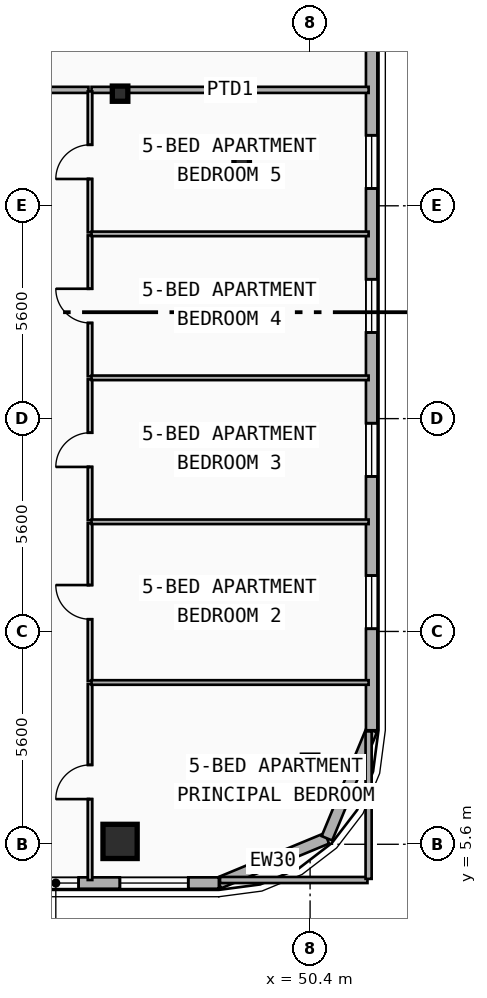
"""IFC4 building model, lengths in metres.
Left out: names, types, materials, properties, quantities, classifications, styles, units other than length and angle.
Written with IfcOpenShell. Run it as: python <this file> out.ifc"""

import sys

from ifc_helpers import new_model, si_unit, direction, frame, frame_2d, origin, origin_2d, place, context, subcontext, project, spatial, rectangle, i_section, extrude, element, fill, save


model = new_model("IFC4")
c1 = context("Model", 3, precision=1e-05, world=origin(), true_north=direction((0.0, 1.0)))
c2 = subcontext(c1, "Body", "Model", "MODEL_VIEW")
j1 = project(units=[si_unit("LENGTHUNIT", "METRE"), si_unit("PLANEANGLEUNIT", "RADIAN")], contexts=[c1])
p1 = place(None, origin())
s1 = spatial("IfcSite", under=j1, at=p1, CompositionType="ELEMENT")
p2 = place(p1, origin())
s2 = spatial("IfcBuilding", under=s1, at=p2, CompositionType="ELEMENT")
p3 = place(p2, frame((0.0, 0.0, 225.6)))
s3 = spatial("IfcBuildingStorey", under=s2, at=p3, CompositionType="ELEMENT", Elevation=225.6)
p4 = place(p3, frame((45.4, 25.35, 0.0), z_axis=(0.0, 0.0, 1.0), x_axis=(1.0, 0.0, 0.0)))
e1 = element("IfcColumn", 1, at=p4, inside=s3, PredefinedType="COLUMN", context=c2, shape_type="SweptSolid", body=[
    extrude(i_section(OverallWidth=0.408, OverallDepth=0.4, WebThickness=0.025, FlangeThickness=0.039, FilletRadius=0.015, at=origin_2d()), origin(), (0.0, 0.0, 1.0), 3.6),
])
p5 = place(p3, frame((45.4, 5.784, 0.0), z_axis=(0.0, -0.090237335163, 0.995920289653), x_axis=(1.0, 0.0, 0.0)))
e2 = element("IfcColumn", 2, at=p5, inside=s3, PredefinedType="COLUMN", context=c2, shape_type="SweptSolid", body=[
    extrude(rectangle(XDim=0.9, YDim=0.9, at=origin_2d()), origin(), (0.0, 0.0, 1.0), 3.615),
])
p6 = place(p3, frame((48.6, 23.6, 0.0), z_axis=(0.0, 0.0, 1.0), x_axis=(1.0, 0.0, 0.0)))
e3 = element("IfcColumn", 3, at=p6, inside=s3, PredefinedType="COLUMN", context=c2, shape_type="SweptSolid", body=[
    extrude(i_section(OverallWidth=0.408, OverallDepth=0.4, WebThickness=0.025, FlangeThickness=0.039, FilletRadius=0.015, at=origin_2d()), origin(), (0.0, 0.0, 1.0), 3.6),
])
p7 = place(p3, frame((50.4, 7.843, 0.0), z_axis=(0.0, -0.079906436036, 0.996802368316), x_axis=(1.0, 0.0, 0.0)))
e4 = element("IfcColumn", 4, at=p7, inside=s3, PredefinedType="COLUMN", context=c2, shape_type="SweptSolid", body=[
    extrude(i_section(OverallWidth=0.408, OverallDepth=0.4, WebThickness=0.025, FlangeThickness=0.039, FilletRadius=0.015, at=origin_2d()), origin(), (0.0, 0.0, 1.0), 3.611),
])
p8 = place(p3, frame((50.843, 5.757, 0.0), z_axis=(0.0, 0.0, 1.0), x_axis=(-0.92389884758, -0.382636798336, 0.0)))
e5 = element("IfcWall", 5, at=p8, inside=s3, PredefinedType="SOLIDWALL", context=c2, shape_type="SweptSolid", body=[
    extrude(rectangle(XDim=3.077, YDim=0.3, at=frame_2d((1.538, 0.0))), origin(), (0.0, 0.0, 1.0), 3.34),
])
p9 = place(p3, frame((52.02, 8.6, 0.0), z_axis=(0.0, 0.0, 1.0), x_axis=(-0.382676475685, -0.923882414032, 0.0)))
e6 = element("IfcWall", 6, at=p9, inside=s3, PredefinedType="SOLIDWALL", context=c2, shape_type="SweptSolid", body=[
    extrude(rectangle(XDim=3.077, YDim=0.3, at=frame_2d((1.539, 0.0))), origin(), (0.0, 0.0, 1.0), 3.34),
])
p10 = place(p3, frame((52.02, 37.2, 0.0), z_axis=(0.0, 0.0, 1.0), x_axis=(0.0, -1.0, 0.0)))
e7 = element("IfcWall", 7, at=p10, inside=s3, PredefinedType="SOLIDWALL", context=c2, shape_type="SweptSolid", body=[
    extrude(rectangle(XDim=28.6, YDim=0.3, at=frame_2d((14.3, 0.0))), origin(), (0.0, 0.0, 1.0), 3.34),
])
p11 = place(p10, frame((2.38, 0.0, 0.34)))
e8 = element("IfcOpeningElement", 8, at=p11, cuts=e7, PredefinedType="OPENING", context=c2, shape_type="SweptSolid", body=[
    extrude(rectangle(XDim=1.4, YDim=2.1, at=frame_2d((0.7, 1.05))), frame((0.0, 0.16, 0.0), z_axis=(0.0, -1.0, 0.0), x_axis=(1.0, 0.0, 0.0)), (0.0, 0.0, 1.0), 0.32),
])
p12 = place(p10, frame((5.84, 0.0, 0.34)))
e9 = element("IfcOpeningElement", 9, at=p12, cuts=e7, PredefinedType="OPENING", context=c2, shape_type="SweptSolid", body=[
    extrude(rectangle(XDim=1.4, YDim=2.1, at=frame_2d((0.7, 1.05))), frame((0.0, 0.16, 0.0), z_axis=(0.0, -1.0, 0.0), x_axis=(1.0, 0.0, 0.0)), (0.0, 0.0, 1.0), 0.32),
])
p13 = place(p10, frame((24.529, 0.0, 0.34)))
e10 = element("IfcOpeningElement", 10, at=p13, cuts=e7, PredefinedType="OPENING", context=c2, shape_type="SweptSolid", body=[
    extrude(rectangle(XDim=1.4, YDim=2.1, at=frame_2d((0.7, 1.05))), frame((0.0, 0.16, 0.0), z_axis=(0.0, -1.0, 0.0), x_axis=(1.0, 0.0, 0.0)), (0.0, 0.0, 1.0), 0.32),
])
p14 = place(p10, frame((20.521, 0.0, 0.34)))
e11 = element("IfcOpeningElement", 11, at=p14, cuts=e7, PredefinedType="OPENING", context=c2, shape_type="SweptSolid", body=[
    extrude(rectangle(XDim=1.4, YDim=2.1, at=frame_2d((0.7, 1.05))), frame((0.0, 0.16, 0.0), z_axis=(0.0, -1.0, 0.0), x_axis=(1.0, 0.0, 0.0)), (0.0, 0.0, 1.0), 0.32),
])
p15 = place(p10, frame((16.733, 0.0, 0.34)))
e12 = element("IfcOpeningElement", 12, at=p15, cuts=e7, PredefinedType="OPENING", context=c2, shape_type="SweptSolid", body=[
    extrude(rectangle(XDim=1.4, YDim=2.1, at=frame_2d((0.7, 1.05))), frame((0.0, 0.16, 0.0), z_axis=(0.0, -1.0, 0.0), x_axis=(1.0, 0.0, 0.0)), (0.0, 0.0, 1.0), 0.32),
])
p16 = place(p10, frame((12.945, 0.0, 0.34)))
e13 = element("IfcOpeningElement", 13, at=p16, cuts=e7, PredefinedType="OPENING", context=c2, shape_type="SweptSolid", body=[
    extrude(rectangle(XDim=1.4, YDim=2.1, at=frame_2d((0.7, 1.05))), frame((0.0, 0.16, 0.0), z_axis=(0.0, -1.0, 0.0), x_axis=(1.0, 0.0, 0.0)), (0.0, 0.0, 1.0), 0.32),
])
p17 = place(p3, frame((48.0, 4.58, 0.0), z_axis=(0.0, 0.0, 1.0), x_axis=(-1.0, 0.0, 0.0)))
e14 = element("IfcWall", 14, at=p17, inside=s3, PredefinedType="SOLIDWALL", context=c2, shape_type="SweptSolid", body=[
    extrude(rectangle(XDim=38.4, YDim=0.3, at=frame_2d((19.2, 0.0))), origin(), (0.0, 0.0, 1.0), 3.34),
])
p18 = place(p17, frame((33.709, 0.0, 0.34)))
e15 = element("IfcOpeningElement", 15, at=p18, cuts=e14, PredefinedType="OPENING", context=c2, shape_type="SweptSolid", body=[
    extrude(rectangle(XDim=1.4, YDim=1.8, at=frame_2d((0.7, 0.9))), frame((0.0, 0.16, 0.0), z_axis=(0.0, -1.0, 0.0), x_axis=(1.0, 0.0, 0.0)), (0.0, 0.0, 1.0), 0.32),
])
p19 = place(p17, frame((29.45, 0.0, 1.85)))
e16 = element("IfcOpeningElement", 16, at=p19, cuts=e14, PredefinedType="OPENING", context=c2, shape_type="SweptSolid", body=[
    extrude(rectangle(XDim=1.1, YDim=0.9, at=frame_2d((0.55, 0.45))), frame((0.0, 0.16, 0.0), z_axis=(0.0, -1.0, 0.0), x_axis=(1.0, 0.0, 0.0)), (0.0, 0.0, 1.0), 0.32),
])
p20 = place(p17, frame((35.994, 0.0, 0.48)))
e17 = element("IfcOpeningElement", 17, at=p20, cuts=e14, PredefinedType="OPENING", context=c2, shape_type="SweptSolid", body=[
    extrude(rectangle(XDim=1.8, YDim=1.8, at=frame_2d((0.9, 0.9))), frame((0.0, 0.16, 0.0), z_axis=(0.0, -1.0, 0.0), x_axis=(1.0, 0.0, 0.0)), (0.0, 0.0, 1.0), 0.32),
])
p21 = place(p17, frame((14.65, 0.0, 0.65)))
e18 = element("IfcOpeningElement", 18, at=p21, cuts=e14, PredefinedType="OPENING", context=c2, shape_type="SweptSolid", body=[
    extrude(rectangle(XDim=2.0, YDim=2.2, at=frame_2d((1.0, 1.1))), frame((0.0, 0.16, 0.0), z_axis=(0.0, -1.0, 0.0), x_axis=(1.0, 0.0, 0.0)), (0.0, 0.0, 1.0), 0.32),
])
p22 = place(p17, frame((23.4, 0.0, 0.65)))
e19 = element("IfcOpeningElement", 19, at=p22, cuts=e14, PredefinedType="OPENING", context=c2, shape_type="SweptSolid", body=[
    extrude(rectangle(XDim=2.0, YDim=2.2, at=frame_2d((1.0, 1.1))), frame((0.0, 0.16, 0.0), z_axis=(0.0, -1.0, 0.0), x_axis=(1.0, 0.0, 0.0)), (0.0, 0.0, 1.0), 0.32),
])
p23 = place(p17, frame((12.25, 0.0, 0.8)))
e20 = element("IfcOpeningElement", 20, at=p23, cuts=e14, PredefinedType="OPENING", context=c2, shape_type="SweptSolid", body=[
    extrude(rectangle(XDim=1.8, YDim=1.8, at=frame_2d((0.9, 0.9))), frame((0.0, 0.16, 0.0), z_axis=(0.0, -1.0, 0.0), x_axis=(1.0, 0.0, 0.0)), (0.0, 0.0, 1.0), 0.32),
])
p24 = place(p17, frame((3.691, 0.0, 1.22)))
e21 = element("IfcOpeningElement", 21, at=p24, cuts=e14, PredefinedType="OPENING", context=c2, shape_type="SweptSolid", body=[
    extrude(rectangle(XDim=1.2, YDim=1.5, at=frame_2d((0.6, 0.75))), frame((0.0, 0.16, 0.0), z_axis=(0.0, -1.0, 0.0), x_axis=(1.0, 0.0, 0.0)), (0.0, 0.0, 1.0), 0.32),
])
p25 = place(p17, frame((8.25, 0.0, 0.52)))
e22 = element("IfcOpeningElement", 22, at=p25, cuts=e14, PredefinedType="OPENING", context=c2, shape_type="SweptSolid", body=[
    extrude(rectangle(XDim=1.1, YDim=1.05, at=frame_2d((0.55, 0.525))), frame((0.0, 0.16, 0.0), z_axis=(0.0, -1.0, 0.0), x_axis=(1.0, 0.0, 0.0)), (0.0, 0.0, 1.0), 0.32),
])
p26 = place(p17, frame((0.805, 0.0, 0.48)))
e23 = element("IfcOpeningElement", 23, at=p26, cuts=e14, PredefinedType="OPENING", context=c2, shape_type="SweptSolid", body=[
    extrude(rectangle(XDim=1.8, YDim=1.8, at=frame_2d((0.9, 0.9))), frame((0.0, 0.16, 0.0), z_axis=(0.0, -1.0, 0.0), x_axis=(1.0, 0.0, 0.0)), (0.0, 0.0, 1.0), 0.32),
])
p27 = place(p3, frame((41.09, 25.45, 0.0), z_axis=(0.0, 0.0, 1.0), x_axis=(1.0, 0.0, 0.0)))
e24 = element("IfcWall", 24, at=p27, inside=s3, PredefinedType="PARTITIONING", context=c2, shape_type="SweptSolid", body=[
    extrude(rectangle(XDim=3.479, YDim=0.16, at=frame_2d((1.74, 0.0))), origin(), (0.0, 0.0, 1.0), 3.34),
])
p28 = place(p27, frame((1.24, 0.0, 0.0)))
e25 = element("IfcOpeningElement", 25, at=p28, cuts=e24, PredefinedType="OPENING", context=c2, shape_type="SweptSolid", body=[
    extrude(rectangle(XDim=1.0, YDim=2.15, at=frame_2d((0.5, 1.075))), frame((0.0, 0.09, 0.0), z_axis=(0.0, -1.0, 0.0), x_axis=(1.0, 0.0, 0.0)), (0.0, 0.0, 1.0), 0.18),
])
p29 = place(p3, frame((44.649, 25.45, 0.0), z_axis=(0.0, 0.0, 1.0), x_axis=(1.0, 0.0, 0.0)))
e26 = element("IfcWall", 26, at=p29, inside=s3, PredefinedType="PARTITIONING", context=c2, shape_type="SweptSolid", body=[
    extrude(rectangle(XDim=7.291, YDim=0.16, at=frame_2d((3.646, 0.0))), origin(), (0.0, 0.0, 1.0), 2.52),
])
p30 = place(p3, frame((44.609, 4.66, 0.0), z_axis=(0.0, 0.0, 1.0), x_axis=(0.0, 1.0, 0.0)))
e27 = element("IfcWall", 27, at=p30, inside=s3, PredefinedType="PARTITIONING", context=c2, shape_type="SweptSolid", body=[
    extrude(rectangle(XDim=5.157, YDim=0.12, at=frame_2d((2.579, 0.0))), origin(), (0.0, 0.0, 1.0), 2.87),
])
p31 = place(p30, frame((2.128, 0.0, 0.0)))
e28 = element("IfcOpeningElement", 28, at=p31, cuts=e27, PredefinedType="OPENING", context=c2, shape_type="SweptSolid", body=[
    extrude(rectangle(XDim=0.9, YDim=2.1, at=frame_2d((0.45, 1.05))), frame((0.0, 0.07, 0.0), z_axis=(0.0, -1.0, 0.0), x_axis=(1.0, 0.0, 0.0)), (0.0, 0.0, 1.0), 0.14),
])
p32 = place(p3, frame((44.609, 9.897, 0.0), z_axis=(0.0, 0.0, 1.0), x_axis=(0.0, 1.0, 0.0)))
e29 = element("IfcWall", 29, at=p32, inside=s3, PredefinedType="PARTITIONING", context=c2, shape_type="SweptSolid", body=[
    extrude(rectangle(XDim=4.148, YDim=0.12, at=frame_2d((2.074, 0.0))), origin(), (0.0, 0.0, 1.0), 2.88),
])
p33 = place(p32, frame((1.624, 0.0, 0.0)))
e30 = element("IfcOpeningElement", 30, at=p33, cuts=e29, PredefinedType="OPENING", context=c2, shape_type="SweptSolid", body=[
    extrude(rectangle(XDim=0.9, YDim=2.1, at=frame_2d((0.45, 1.05))), frame((0.0, 0.07, 0.0), z_axis=(0.0, -1.0, 0.0), x_axis=(1.0, 0.0, 0.0)), (0.0, 0.0, 1.0), 0.14),
])
p34 = place(p3, frame((44.609, 14.125, 0.0), z_axis=(0.0, 0.0, 1.0), x_axis=(0.0, 1.0, 0.0)))
e31 = element("IfcWall", 31, at=p34, inside=s3, PredefinedType="PARTITIONING", context=c2, shape_type="SweptSolid", body=[
    extrude(rectangle(XDim=3.708, YDim=0.12, at=frame_2d((1.854, 0.0))), origin(), (0.0, 0.0, 1.0), 2.87),
])
p35 = place(p34, frame((1.404, 0.0, 0.0)))
e32 = element("IfcOpeningElement", 32, at=p35, cuts=e31, PredefinedType="OPENING", context=c2, shape_type="SweptSolid", body=[
    extrude(rectangle(XDim=0.9, YDim=2.1, at=frame_2d((0.45, 1.05))), frame((0.0, 0.07, 0.0), z_axis=(0.0, -1.0, 0.0), x_axis=(1.0, 0.0, 0.0)), (0.0, 0.0, 1.0), 0.14),
])
p36 = place(p3, frame((44.609, 17.913, 0.0), z_axis=(0.0, 0.0, 1.0), x_axis=(0.0, 1.0, 0.0)))
e33 = element("IfcWall", 33, at=p36, inside=s3, PredefinedType="PARTITIONING", context=c2, shape_type="SweptSolid", body=[
    extrude(rectangle(XDim=3.708, YDim=0.12, at=frame_2d((1.854, 0.0))), origin(), (0.0, 0.0, 1.0), 2.88),
])
p37 = place(p36, frame((1.404, 0.0, 0.0)))
e34 = element("IfcOpeningElement", 34, at=p37, cuts=e33, PredefinedType="OPENING", context=c2, shape_type="SweptSolid", body=[
    extrude(rectangle(XDim=0.9, YDim=2.1, at=frame_2d((0.45, 1.05))), frame((0.0, 0.07, 0.0), z_axis=(0.0, -1.0, 0.0), x_axis=(1.0, 0.0, 0.0)), (0.0, 0.0, 1.0), 0.14),
])
p38 = place(p3, frame((44.609, 21.701, 0.0), z_axis=(0.0, 0.0, 1.0), x_axis=(0.0, 1.0, 0.0)))
e35 = element("IfcWall", 35, at=p38, inside=s3, PredefinedType="PARTITIONING", context=c2, shape_type="SweptSolid", body=[
    extrude(rectangle(XDim=3.709, YDim=0.12, at=frame_2d((1.854, 0.0))), origin(), (0.0, 0.0, 1.0), 2.87),
])
p39 = place(p38, frame((1.405, 0.0, 0.0)))
e36 = element("IfcOpeningElement", 36, at=p39, cuts=e35, PredefinedType="OPENING", context=c2, shape_type="SweptSolid", body=[
    extrude(rectangle(XDim=0.9, YDim=2.1, at=frame_2d((0.45, 1.05))), frame((0.0, 0.07, 0.0), z_axis=(0.0, -1.0, 0.0), x_axis=(1.0, 0.0, 0.0)), (0.0, 0.0, 1.0), 0.14),
])
for number, where, z_axis, x_axis in (
    (37, (44.649, 9.857, 0.0), (0.0, 0.0, 1.0), (1.0, 0.0, 0.0)),
    (38, (44.649, 14.085, 0.0), (0.0, 0.0, 1.0), (1.0, 0.0, 0.0)),
    (39, (44.649, 17.873, 0.0), (0.0, 0.0, 1.0), (1.0, 0.0, 0.0)),
    (40, (44.649, 21.661, 0.0), (0.0, 0.0, 1.0), (1.0, 0.0, 0.0)),
):
    element("IfcWall", number, at=place(p3, frame(where, z_axis=z_axis, x_axis=x_axis)), inside=s3, PredefinedType="PARTITIONING", context=c2, shape_type="SweptSolid", body=[
        extrude(rectangle(XDim=7.291, YDim=0.12, at=frame_2d((3.646, 0.0))), origin(), (0.0, 0.0, 1.0), 2.52),
    ])
p40 = place(p3, frame((48.03, 4.66, 0.0), z_axis=(0.0, 0.0, 1.0), x_axis=(1.0, 0.0, 0.0)))
e41 = element("IfcWall", 41, at=p40, inside=s3, PredefinedType="PARTITIONING", context=c2, shape_type="SweptSolid", body=[
    extrude(rectangle(XDim=3.88, YDim=0.16, at=frame_2d((1.94, 0.0))), origin(), (0.0, 0.0, 1.0), 3.34),
])
p41 = place(p3, frame((51.94, 4.69, 0.0), z_axis=(0.0, 0.0, 1.0), x_axis=(0.0, 1.0, 0.0)))
e42 = element("IfcWall", 42, at=p41, inside=s3, PredefinedType="PARTITIONING", context=c2, shape_type="SweptSolid", body=[
    extrude(rectangle(XDim=3.88, YDim=0.16, at=frame_2d((1.94, 0.0))), origin(), (0.0, 0.0, 1.0), 3.34),
])
p42 = place(p13, origin())
e43 = element("IfcWindow", 43, at=p42, inside=s3, PartitioningType="SINGLE_PANEL", PredefinedType="WINDOW", context=c2, shape_type="SweptSolid", body=[
    extrude(rectangle(XDim=1.4, YDim=2.1, at=frame_2d((0.7, 1.05))), frame((0.0, 0.03, 0.0), z_axis=(0.0, -1.0, 0.0), x_axis=(1.0, 0.0, 0.0)), (0.0, 0.0, 1.0), 0.06),
])
fill(e10, e43)
p43 = place(p14, origin())
e44 = element("IfcWindow", 44, at=p43, inside=s3, PartitioningType="SINGLE_PANEL", PredefinedType="WINDOW", context=c2, shape_type="SweptSolid", body=[
    extrude(rectangle(XDim=1.4, YDim=2.1, at=frame_2d((0.7, 1.05))), frame((0.0, 0.03, 0.0), z_axis=(0.0, -1.0, 0.0), x_axis=(1.0, 0.0, 0.0)), (0.0, 0.0, 1.0), 0.06),
])
fill(e11, e44)
p44 = place(p15, origin())
e45 = element("IfcWindow", 45, at=p44, inside=s3, PartitioningType="SINGLE_PANEL", PredefinedType="WINDOW", context=c2, shape_type="SweptSolid", body=[
    extrude(rectangle(XDim=1.4, YDim=2.1, at=frame_2d((0.7, 1.05))), frame((0.0, 0.03, 0.0), z_axis=(0.0, -1.0, 0.0), x_axis=(1.0, 0.0, 0.0)), (0.0, 0.0, 1.0), 0.06),
])
fill(e12, e45)
p45 = place(p16, origin())
e46 = element("IfcWindow", 46, at=p45, inside=s3, PartitioningType="SINGLE_PANEL", PredefinedType="WINDOW", context=c2, shape_type="SweptSolid", body=[
    extrude(rectangle(XDim=1.4, YDim=2.1, at=frame_2d((0.7, 1.05))), frame((0.0, 0.03, 0.0), z_axis=(0.0, -1.0, 0.0), x_axis=(1.0, 0.0, 0.0)), (0.0, 0.0, 1.0), 0.06),
])
fill(e13, e46)
p46 = place(p24, origin())
e47 = element("IfcWindow", 47, at=p46, inside=s3, PartitioningType="SINGLE_PANEL", PredefinedType="WINDOW", context=c2, shape_type="SweptSolid", body=[
    extrude(rectangle(XDim=1.2, YDim=1.5, at=frame_2d((0.6, 0.75))), frame((0.0, 0.03, 0.0), z_axis=(0.0, -1.0, 0.0), x_axis=(1.0, 0.0, 0.0)), (0.0, 0.0, 1.0), 0.06),
])
fill(e21, e47)
p47 = place(p26, origin())
e48 = element("IfcWindow", 48, at=p47, inside=s3, PartitioningType="SINGLE_PANEL", PredefinedType="WINDOW", context=c2, shape_type="SweptSolid", body=[
    extrude(rectangle(XDim=1.8, YDim=1.8, at=frame_2d((0.9, 0.9))), frame((0.0, 0.03, 0.0), z_axis=(0.0, -1.0, 0.0), x_axis=(1.0, 0.0, 0.0)), (0.0, 0.0, 1.0), 0.06),
])
fill(e23, e48)
p48 = place(p31, origin())
e49 = element("IfcDoor", 49, at=p48, inside=s3, OperationType="SINGLE_SWING_LEFT", PredefinedType="DOOR", context=c2, shape_type="SweptSolid", body=[
    extrude(rectangle(XDim=0.9, YDim=2.1, at=frame_2d((0.45, 1.05))), frame((0.0, 0.025, 0.0), z_axis=(0.0, -1.0, 0.0), x_axis=(1.0, 0.0, 0.0)), (0.0, 0.0, 1.0), 0.05),
])
fill(e28, e49)
p49 = place(p33, origin())
e50 = element("IfcDoor", 50, at=p49, inside=s3, OperationType="SINGLE_SWING_RIGHT", PredefinedType="DOOR", context=c2, shape_type="SweptSolid", body=[
    extrude(rectangle(XDim=0.9, YDim=2.1, at=frame_2d((0.45, 1.05))), frame((0.0, 0.025, 0.0), z_axis=(0.0, -1.0, 0.0), x_axis=(1.0, 0.0, 0.0)), (0.0, 0.0, 1.0), 0.05),
])
fill(e30, e50)
p50 = place(p35, origin())
e51 = element("IfcDoor", 51, at=p50, inside=s3, OperationType="SINGLE_SWING_LEFT", PredefinedType="DOOR", context=c2, shape_type="SweptSolid", body=[
    extrude(rectangle(XDim=0.9, YDim=2.1, at=frame_2d((0.45, 1.05))), frame((0.0, 0.025, 0.0), z_axis=(0.0, -1.0, 0.0), x_axis=(1.0, 0.0, 0.0)), (0.0, 0.0, 1.0), 0.05),
])
fill(e32, e51)
p51 = place(p37, origin())
e52 = element("IfcDoor", 52, at=p51, inside=s3, OperationType="SINGLE_SWING_RIGHT", PredefinedType="DOOR", context=c2, shape_type="SweptSolid", body=[
    extrude(rectangle(XDim=0.9, YDim=2.1, at=frame_2d((0.45, 1.05))), frame((0.0, 0.025, 0.0), z_axis=(0.0, -1.0, 0.0), x_axis=(1.0, 0.0, 0.0)), (0.0, 0.0, 1.0), 0.05),
])
fill(e34, e52)
p52 = place(p39, origin())
e53 = element("IfcDoor", 53, at=p52, inside=s3, OperationType="SINGLE_SWING_LEFT", PredefinedType="DOOR", context=c2, shape_type="SweptSolid", body=[
    extrude(rectangle(XDim=0.9, YDim=2.1, at=frame_2d((0.45, 1.05))), frame((0.0, 0.025, 0.0), z_axis=(0.0, -1.0, 0.0), x_axis=(1.0, 0.0, 0.0)), (0.0, 0.0, 1.0), 0.05),
])
fill(e36, e53)
save(model, sys.argv[1])
